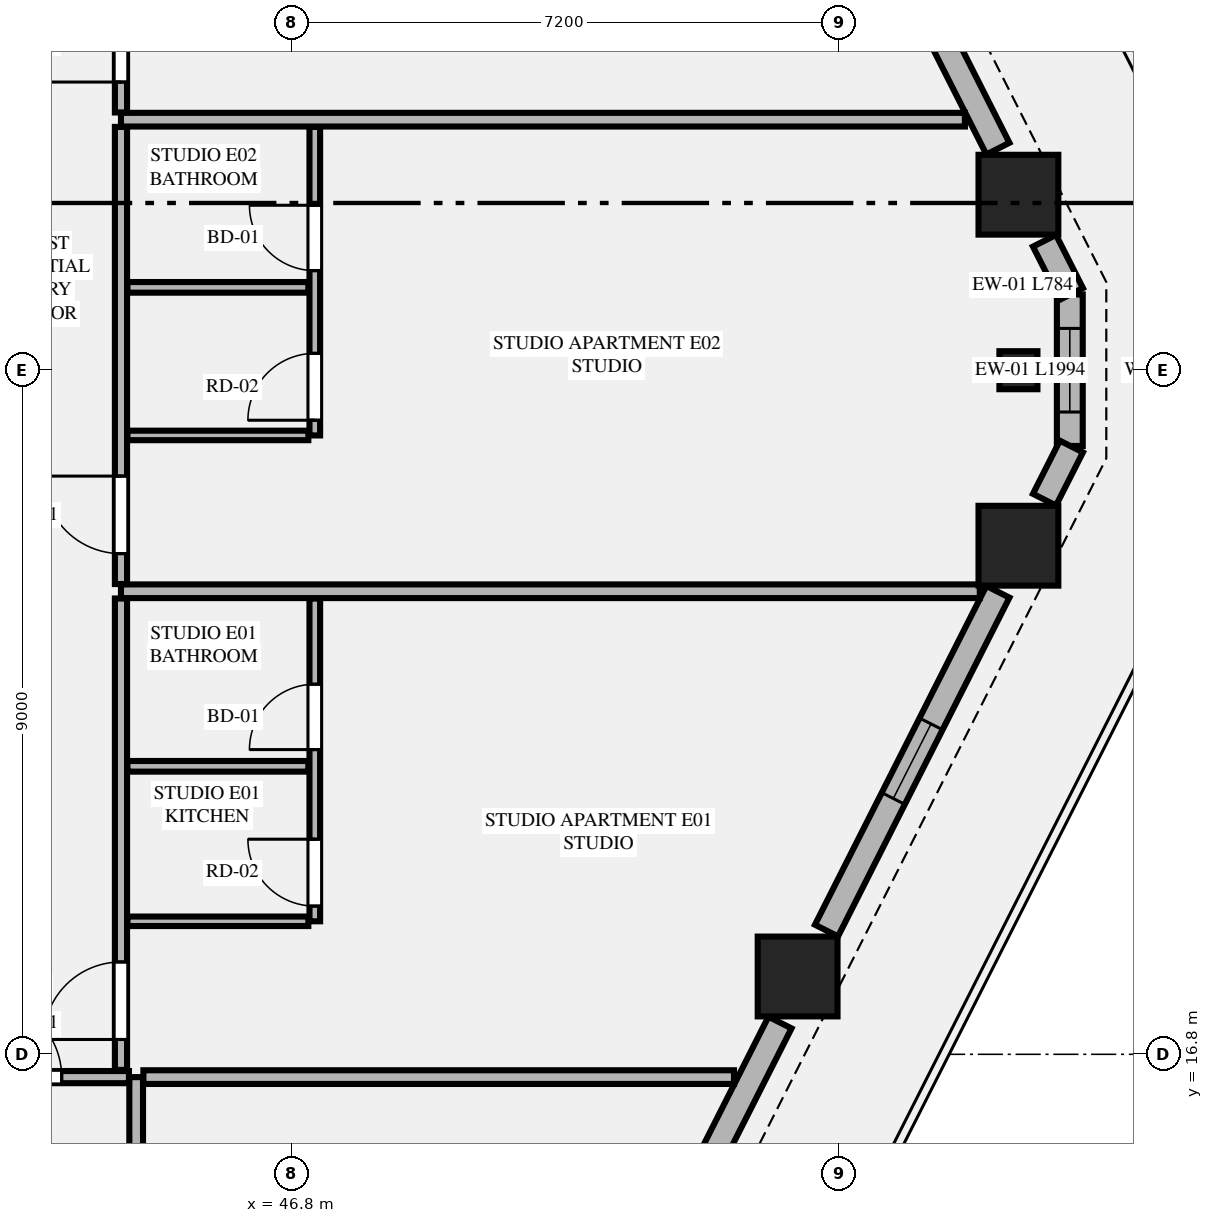
"""IFC4 building model, lengths in metres.
Left out: names, types, materials, properties, quantities, classifications, styles, units other than length and angle.
Written with IfcOpenShell. Run it as: python <this file> out.ifc"""

import sys

from ifc_helpers import new_model, si_unit, direction, frame, frame_2d, origin, origin_2d, place, context, subcontext, project, spatial, rectangle, extrude, element, fill, save


model = new_model("IFC4")
c1 = context("Model", 3, precision=1e-05, world=origin(), true_north=direction((0.0, 1.0)))
c2 = subcontext(c1, "Body", "Model", "MODEL_VIEW")
j1 = project(units=[si_unit("LENGTHUNIT", "METRE"), si_unit("PLANEANGLEUNIT", "RADIAN")], contexts=[c1])
p1 = place(None, origin())
s1 = spatial("IfcSite", under=j1, at=p1, CompositionType="ELEMENT")
p2 = place(p1, origin())
s2 = spatial("IfcBuilding", under=s1, at=p2, CompositionType="ELEMENT")
p3 = place(p2, frame((0.0, 0.0, 98.4)))
s3 = spatial("IfcBuildingStorey", under=s2, at=p3, CompositionType="ELEMENT", Elevation=98.4)
for number, where, z_axis, x_axis in (
    (1, (53.452, 17.824, 0.0), (0.0, 0.0, 1.0), (1.0, 0.0, 0.0)),
    (2, (56.357, 23.491, 0.0), (0.0, 0.0, 1.0), (1.0, 0.0, 0.0)),
    (3, (56.357, 28.109, 0.0), (0.0, 0.0, 1.0), (1.0, 0.0, 0.0)),
):
    element("IfcColumn", number, at=place(p3, frame(where, z_axis=z_axis, x_axis=x_axis)), inside=s3, PredefinedType="COLUMN", context=c2, shape_type="SweptSolid", body=[
        extrude(rectangle(XDim=1.05, YDim=1.05, at=origin_2d()), origin(), (0.0, 0.0, 1.0), 3.55),
    ])
p4 = place(p3, frame((56.357, 25.8, 0.0), z_axis=(0.0, 0.0, 1.0), x_axis=(0.0, 1.0, 0.0)))
e4 = element("IfcColumn", 4, at=p4, inside=s3, PredefinedType="PILASTER", context=c2, shape_type="SweptSolid", body=[
    extrude(rectangle(XDim=0.5, YDim=0.35, at=origin_2d()), origin(), (0.0, 0.0, 1.0), 3.55),
])
p5 = place(p3, frame((57.033, 24.803, 0.0), z_axis=(0.0, 0.0, 1.0), x_axis=(0.0, 1.0, 0.0)))
e5 = element("IfcWall", 5, at=p5, inside=s3, PredefinedType="STANDARD", context=c2, shape_type="SweptSolid", body=[
    extrude(rectangle(XDim=1.994, YDim=0.34, at=frame_2d((0.997, 0.0))), origin(), (0.0, 0.0, 1.0), 3.34),
])
p6 = place(p5, frame((0.447, 0.0, 0.75)))
e6 = element("IfcOpeningElement", 6, at=p6, cuts=e5, PredefinedType="OPENING", context=c2, shape_type="SweptSolid", body=[
    extrude(rectangle(XDim=1.1, YDim=2.0, at=frame_2d((0.55, 1.0))), frame((0.0, 0.18, 0.0), z_axis=(0.0, -1.0, 0.0), x_axis=(1.0, 0.0, 0.0)), (0.0, 0.0, 1.0), 0.36),
])
p7 = place(p3, frame((50.863, 12.561, 0.0), z_axis=(0.0, 0.0, 1.0), x_axis=(0.451567731634, 0.892236842855, 0.0)))
e7 = element("IfcWall", 7, at=p7, inside=s3, PredefinedType="STANDARD", context=c2, shape_type="SweptSolid", body=[
    extrude(rectangle(XDim=5.219, YDim=0.34, at=frame_2d((2.61, 0.0))), origin(), (0.0, 0.0, 1.0), 2.797),
])
p8 = place(p7, frame((2.06, 0.0, 0.75)))
e8 = element("IfcOpeningElement", 8, at=p8, cuts=e7, PredefinedType="OPENING", context=c2, shape_type="SweptSolid", body=[
    extrude(rectangle(XDim=1.1, YDim=1.897, at=frame_2d((0.55, 0.948))), frame((0.0, 0.18, 0.0), z_axis=(0.0, -1.0, 0.0), x_axis=(1.0, 0.0, 0.0)), (0.0, 0.0, 1.0), 0.36),
])
p9 = place(p3, frame((53.832, 18.428, 0.0), z_axis=(0.0, 0.0, 1.0), x_axis=(0.451431617681, 0.892305718102, 0.0)))
e9 = element("IfcWall", 9, at=p9, inside=s3, PredefinedType="STANDARD", context=c2, shape_type="SweptSolid", body=[
    extrude(rectangle(XDim=4.995, YDim=0.34, at=frame_2d((2.498, 0.0))), origin(), (0.0, 0.0, 1.0), 2.797),
])
p10 = place(p9, frame((1.947, 0.0, 0.75)))
e10 = element("IfcOpeningElement", 10, at=p10, cuts=e9, PredefinedType="OPENING", context=c2, shape_type="SweptSolid", body=[
    extrude(rectangle(XDim=1.1, YDim=1.897, at=frame_2d((0.55, 0.948))), frame((0.0, 0.18, 0.0), z_axis=(0.0, -1.0, 0.0), x_axis=(1.0, 0.0, 0.0)), (0.0, 0.0, 1.0), 0.36),
])
for number, where, z_axis, x_axis in (
    (11, (56.7, 24.097, 0.0), (0.0, 0.0, 1.0), (0.452, 0.892, 0.0)),
    (12, (57.054, 26.804, 0.0), (0.0, 0.0, 1.0), (-0.452, 0.892, 0.0)),
):
    element("IfcWall", number, at=place(p3, frame(where, z_axis=z_axis, x_axis=x_axis)), inside=s3, PredefinedType="STANDARD", context=c2, shape_type="SweptSolid", body=[
        extrude(rectangle(XDim=0.783, YDim=0.34, at=frame_2d((0.392, 0.0))), origin(), (0.0, 0.0, 1.0), 3.34),
    ])
p11 = place(p3, frame((56.087, 28.715, 0.0), z_axis=(0.0, 0.0, 1.0), x_axis=(-0.451431617681, 0.892305718102, 0.0)))
e13 = element("IfcWall", 13, at=p11, inside=s3, PredefinedType="STANDARD", context=c2, shape_type="SweptSolid", body=[
    extrude(rectangle(XDim=4.995, YDim=0.34, at=frame_2d((2.498, 0.0))), origin(), (0.0, 0.0, 1.0), 2.797),
])
p12 = place(p11, frame((1.947, 0.0, 0.75)))
e14 = element("IfcOpeningElement", 14, at=p12, cuts=e13, PredefinedType="OPENING", context=c2, shape_type="SweptSolid", body=[
    extrude(rectangle(XDim=1.1, YDim=1.897, at=frame_2d((0.55, 0.948))), frame((0.0, 0.18, 0.0), z_axis=(0.0, -1.0, 0.0), x_axis=(1.0, 0.0, 0.0)), (0.0, 0.0, 1.0), 0.36),
])
p13 = place(p3, frame((44.75, 4.105, 0.0), z_axis=(0.0, 0.0, 1.0), x_axis=(0.0, 1.0, 0.0)))
e15 = element("IfcWall", 15, at=p13, inside=s3, PredefinedType="PARTITIONING", context=c2, shape_type="SweptSolid", body=[
    extrude(rectangle(XDim=12.395, YDim=0.18, at=frame_2d((6.198, 0.0))), origin(), (0.0, 0.0, 1.0), 3.34),
])
p14 = place(p3, frame((28.663, 16.5, 0.0), z_axis=(0.0, 0.0, 1.0), x_axis=(1.0, 0.0, 0.0)))
e16 = element("IfcWall", 16, at=p14, inside=s3, PredefinedType="PARTITIONING", context=c2, shape_type="SweptSolid", body=[
    extrude(rectangle(XDim=15.992, YDim=0.16, at=frame_2d((7.996, 0.0))), origin(), (0.0, 0.0, 1.0), 3.34),
])
p15 = place(p14, frame((14.087, 0.0, 0.0)))
e17 = element("IfcOpeningElement", 17, at=p15, cuts=e16, PredefinedType="OPENING", context=c2, shape_type="SweptSolid", body=[
    extrude(rectangle(XDim=1.02, YDim=2.25, at=frame_2d((0.51, 1.125))), frame((0.0, 0.09, 0.0), z_axis=(0.0, -1.0, 0.0), x_axis=(1.0, 0.0, 0.0)), (0.0, 0.0, 1.0), 0.18),
])
p16 = place(p3, frame((44.845, 16.5, 0.0), z_axis=(0.0, 0.0, 1.0), x_axis=(1.0, 0.0, 0.0)))
e18 = element("IfcWall", 18, at=p16, inside=s3, PredefinedType="PARTITIONING", context=c2, shape_type="SweptSolid", body=[
    extrude(rectangle(XDim=7.77, YDim=0.18, at=frame_2d((3.885, 0.0))), origin(), (0.0, 0.0, 1.0), 3.34),
])
p17 = place(p3, frame((44.55, 16.595, 0.0), z_axis=(0.0, 0.0, 1.0), x_axis=(0.0, 1.0, 0.0)))
e19 = element("IfcWall", 19, at=p17, inside=s3, PredefinedType="PARTITIONING", context=c2, shape_type="SweptSolid", body=[
    extrude(rectangle(XDim=6.202, YDim=0.16, at=frame_2d((3.101, 0.0))), origin(), (0.0, 0.0, 1.0), 3.34),
])
p18 = place(p17, frame((0.4, 0.0, 0.0)))
e20 = element("IfcOpeningElement", 20, at=p18, cuts=e19, PredefinedType="OPENING", context=c2, shape_type="SweptSolid", body=[
    extrude(rectangle(XDim=1.02, YDim=2.25, at=frame_2d((0.51, 1.125))), frame((0.0, 0.09, 0.0), z_axis=(0.0, -1.0, 0.0), x_axis=(1.0, 0.0, 0.0)), (0.0, 0.0, 1.0), 0.18),
])
p19 = place(p3, frame((44.635, 18.55, 0.0), z_axis=(0.0, 0.0, 1.0), x_axis=(1.0, 0.0, 0.0)))
e21 = element("IfcWall", 21, at=p19, inside=s3, PredefinedType="PARTITIONING", context=c2, shape_type="SweptSolid", body=[
    extrude(rectangle(XDim=2.38, YDim=0.125, at=frame_2d((1.19, 0.0))), origin(), (0.0, 0.0, 1.0), 2.722),
])
p20 = place(p3, frame((47.1, 18.55, 0.0), z_axis=(0.0, 0.0, 1.0), x_axis=(0.0, 1.0, 0.0)))
e22 = element("IfcWall", 22, at=p20, inside=s3, PredefinedType="PLUMBINGWALL", context=c2, shape_type="SweptSolid", body=[
    extrude(rectangle(XDim=4.247, YDim=0.14, at=frame_2d((2.124, 0.0))), origin(), (0.0, 0.0, 1.0), 3.34),
])
p21 = place(p20, frame((2.259, 0.0, 0.0)))
e23 = element("IfcOpeningElement", 23, at=p21, cuts=e22, PredefinedType="OPENING", context=c2, shape_type="SweptSolid", body=[
    extrude(rectangle(XDim=0.86, YDim=2.1, at=frame_2d((0.43, 1.05))), frame((0.0, 0.08, 0.0), z_axis=(0.0, -1.0, 0.0), x_axis=(1.0, 0.0, 0.0)), (0.0, 0.0, 1.0), 0.16),
])
p22 = place(p20, frame((0.2, 0.0, 0.0)))
e24 = element("IfcOpeningElement", 24, at=p22, cuts=e22, PredefinedType="OPENING", context=c2, shape_type="SweptSolid", body=[
    extrude(rectangle(XDim=0.88, YDim=2.15, at=frame_2d((0.44, 1.075))), frame((0.0, 0.08, 0.0), z_axis=(0.0, -1.0, 0.0), x_axis=(1.0, 0.0, 0.0)), (0.0, 0.0, 1.0), 0.16),
])
p23 = place(p3, frame((44.635, 20.589, 0.0), z_axis=(0.0, 0.0, 1.0), x_axis=(1.0, 0.0, 0.0)))
e25 = element("IfcWall", 25, at=p23, inside=s3, PredefinedType="PLUMBINGWALL", context=c2, shape_type="SweptSolid", body=[
    extrude(rectangle(XDim=2.38, YDim=0.14, at=frame_2d((1.19, 0.0))), origin(), (0.0, 0.0, 1.0), 3.34),
])
p24 = place(p3, frame((44.55, 22.892, 0.0), z_axis=(0.0, 0.0, 1.0), x_axis=(1.0, 0.0, 0.0)))
e26 = element("IfcWall", 26, at=p24, inside=s3, PredefinedType="PARTITIONING", context=c2, shape_type="SweptSolid", body=[
    extrude(rectangle(XDim=11.299, YDim=0.18, at=frame_2d((5.649, 0.0))), origin(), (0.0, 0.0, 1.0), 3.34),
])
p25 = place(p3, frame((44.55, 22.987, 0.0), z_axis=(0.0, 0.0, 1.0), x_axis=(0.0, 1.0, 0.0)))
e27 = element("IfcWall", 27, at=p25, inside=s3, PredefinedType="PARTITIONING", context=c2, shape_type="SweptSolid", body=[
    extrude(rectangle(XDim=6.014, YDim=0.16, at=frame_2d((3.007, 0.0))), origin(), (0.0, 0.0, 1.0), 3.34),
])
p26 = place(p25, frame((0.4, 0.0, 0.0)))
e28 = element("IfcOpeningElement", 28, at=p26, cuts=e27, PredefinedType="OPENING", context=c2, shape_type="SweptSolid", body=[
    extrude(rectangle(XDim=1.02, YDim=2.25, at=frame_2d((0.51, 1.125))), frame((0.0, 0.09, 0.0), z_axis=(0.0, -1.0, 0.0), x_axis=(1.0, 0.0, 0.0)), (0.0, 0.0, 1.0), 0.18),
])
p27 = place(p3, frame((44.635, 24.942, 0.0), z_axis=(0.0, 0.0, 1.0), x_axis=(1.0, 0.0, 0.0)))
e29 = element("IfcWall", 29, at=p27, inside=s3, PredefinedType="PARTITIONING", context=c2, shape_type="SweptSolid", body=[
    extrude(rectangle(XDim=2.38, YDim=0.125, at=frame_2d((1.19, 0.0))), origin(), (0.0, 0.0, 1.0), 3.34),
])
p28 = place(p3, frame((47.1, 24.942, 0.0), z_axis=(0.0, 0.0, 1.0), x_axis=(0.0, 1.0, 0.0)))
e30 = element("IfcWall", 30, at=p28, inside=s3, PredefinedType="PLUMBINGWALL", context=c2, shape_type="SweptSolid", body=[
    extrude(rectangle(XDim=4.059, YDim=0.14, at=frame_2d((2.03, 0.0))), origin(), (0.0, 0.0, 1.0), 3.34),
])
p29 = place(p28, frame((2.168, 0.0, 0.0)))
e31 = element("IfcOpeningElement", 31, at=p29, cuts=e30, PredefinedType="OPENING", context=c2, shape_type="SweptSolid", body=[
    extrude(rectangle(XDim=0.86, YDim=2.1, at=frame_2d((0.43, 1.05))), frame((0.0, 0.08, 0.0), z_axis=(0.0, -1.0, 0.0), x_axis=(1.0, 0.0, 0.0)), (0.0, 0.0, 1.0), 0.16),
])
p30 = place(p28, frame((0.2, 0.0, 0.0)))
e32 = element("IfcOpeningElement", 32, at=p30, cuts=e30, PredefinedType="OPENING", context=c2, shape_type="SweptSolid", body=[
    extrude(rectangle(XDim=0.88, YDim=2.15, at=frame_2d((0.44, 1.075))), frame((0.0, 0.08, 0.0), z_axis=(0.0, -1.0, 0.0), x_axis=(1.0, 0.0, 0.0)), (0.0, 0.0, 1.0), 0.16),
])
p31 = place(p3, frame((44.635, 26.89, 0.0), z_axis=(0.0, 0.0, 1.0), x_axis=(1.0, 0.0, 0.0)))
e33 = element("IfcWall", 33, at=p31, inside=s3, PredefinedType="PLUMBINGWALL", context=c2, shape_type="SweptSolid", body=[
    extrude(rectangle(XDim=2.38, YDim=0.14, at=frame_2d((1.19, 0.0))), origin(), (0.0, 0.0, 1.0), 3.34),
])
p32 = place(p3, frame((44.55, 29.096, 0.0), z_axis=(0.0, 0.0, 1.0), x_axis=(1.0, 0.0, 0.0)))
e34 = element("IfcWall", 34, at=p32, inside=s3, PredefinedType="PARTITIONING", context=c2, shape_type="SweptSolid", body=[
    extrude(rectangle(XDim=11.103, YDim=0.18, at=frame_2d((5.552, 0.0))), origin(), (0.0, 0.0, 1.0), 3.34),
])
p33 = place(p3, frame((44.55, 29.191, 0.0), z_axis=(0.0, 0.0, 1.0), x_axis=(0.0, 1.0, 0.0)))
e35 = element("IfcWall", 35, at=p33, inside=s3, PredefinedType="PARTITIONING", context=c2, shape_type="SweptSolid", body=[
    extrude(rectangle(XDim=6.014, YDim=0.16, at=frame_2d((3.007, 0.0))), origin(), (0.0, 0.0, 1.0), 3.34),
])
p34 = place(p33, frame((0.4, 0.0, 0.0)))
e36 = element("IfcOpeningElement", 36, at=p34, cuts=e35, PredefinedType="OPENING", context=c2, shape_type="SweptSolid", body=[
    extrude(rectangle(XDim=1.02, YDim=2.25, at=frame_2d((0.51, 1.125))), frame((0.0, 0.09, 0.0), z_axis=(0.0, -1.0, 0.0), x_axis=(1.0, 0.0, 0.0)), (0.0, 0.0, 1.0), 0.18),
])
p35 = place(p10, origin())
e37 = element("IfcWindow", 37, at=p35, inside=s3, PartitioningType="SINGLE_PANEL", PredefinedType="WINDOW", context=c2, shape_type="SweptSolid", body=[
    extrude(rectangle(XDim=1.1, YDim=1.897, at=frame_2d((0.55, 0.948))), frame((0.0, 0.03, 0.0), z_axis=(0.0, -1.0, 0.0), x_axis=(1.0, 0.0, 0.0)), (0.0, 0.0, 1.0), 0.06),
])
fill(e10, e37)
p36 = place(p15, origin())
e38 = element("IfcDoor", 38, at=p36, inside=s3, OperationType="SINGLE_SWING_LEFT", PredefinedType="DOOR", context=c2, shape_type="SweptSolid", body=[
    extrude(rectangle(XDim=1.02, YDim=2.25, at=frame_2d((0.51, 1.125))), frame((0.0, 0.025, 0.0), z_axis=(0.0, -1.0, 0.0), x_axis=(1.0, 0.0, 0.0)), (0.0, 0.0, 1.0), 0.05),
])
fill(e17, e38)
p37 = place(p21, origin())
e39 = element("IfcDoor", 39, at=p37, inside=s3, OperationType="SINGLE_SWING_LEFT", PredefinedType="DOOR", context=c2, shape_type="SweptSolid", body=[
    extrude(rectangle(XDim=0.86, YDim=2.1, at=frame_2d((0.43, 1.05))), frame((0.0, 0.025, 0.0), z_axis=(0.0, -1.0, 0.0), x_axis=(1.0, 0.0, 0.0)), (0.0, 0.0, 1.0), 0.05),
])
fill(e23, e39)
p38 = place(p18, origin())
e40 = element("IfcDoor", 40, at=p38, inside=s3, OperationType="SINGLE_SWING_LEFT", PredefinedType="DOOR", context=c2, shape_type="SweptSolid", body=[
    extrude(rectangle(XDim=1.02, YDim=2.25, at=frame_2d((0.51, 1.125))), frame((0.0, 0.025, 0.0), z_axis=(0.0, -1.0, 0.0), x_axis=(1.0, 0.0, 0.0)), (0.0, 0.0, 1.0), 0.05),
])
fill(e20, e40)
p39 = place(p22, origin())
e41 = element("IfcDoor", 41, at=p39, inside=s3, OperationType="SINGLE_SWING_RIGHT", PredefinedType="DOOR", context=c2, shape_type="SweptSolid", body=[
    extrude(rectangle(XDim=0.88, YDim=2.15, at=frame_2d((0.44, 1.075))), frame((0.0, 0.025, 0.0), z_axis=(0.0, -1.0, 0.0), x_axis=(1.0, 0.0, 0.0)), (0.0, 0.0, 1.0), 0.05),
])
fill(e24, e41)
p40 = place(p29, origin())
e42 = element("IfcDoor", 42, at=p40, inside=s3, OperationType="SINGLE_SWING_RIGHT", PredefinedType="DOOR", context=c2, shape_type="SweptSolid", body=[
    extrude(rectangle(XDim=0.86, YDim=2.1, at=frame_2d((0.43, 1.05))), frame((0.0, 0.025, 0.0), z_axis=(0.0, -1.0, 0.0), x_axis=(1.0, 0.0, 0.0)), (0.0, 0.0, 1.0), 0.05),
])
fill(e31, e42)
p41 = place(p26, origin())
e43 = element("IfcDoor", 43, at=p41, inside=s3, OperationType="SINGLE_SWING_RIGHT", PredefinedType="DOOR", context=c2, shape_type="SweptSolid", body=[
    extrude(rectangle(XDim=1.02, YDim=2.25, at=frame_2d((0.51, 1.125))), frame((0.0, 0.025, 0.0), z_axis=(0.0, -1.0, 0.0), x_axis=(1.0, 0.0, 0.0)), (0.0, 0.0, 1.0), 0.05),
])
fill(e28, e43)
p42 = place(p30, origin())
e44 = element("IfcDoor", 44, at=p42, inside=s3, OperationType="SINGLE_SWING_LEFT", PredefinedType="DOOR", context=c2, shape_type="SweptSolid", body=[
    extrude(rectangle(XDim=0.88, YDim=2.15, at=frame_2d((0.44, 1.075))), frame((0.0, 0.025, 0.0), z_axis=(0.0, -1.0, 0.0), x_axis=(1.0, 0.0, 0.0)), (0.0, 0.0, 1.0), 0.05),
])
fill(e32, e44)
p43 = place(p34, origin())
e45 = element("IfcDoor", 45, at=p43, inside=s3, OperationType="SINGLE_SWING_LEFT", PredefinedType="DOOR", context=c2, shape_type="SweptSolid", body=[
    extrude(rectangle(XDim=1.02, YDim=2.25, at=frame_2d((0.51, 1.125))), frame((0.0, 0.025, 0.0), z_axis=(0.0, -1.0, 0.0), x_axis=(1.0, 0.0, 0.0)), (0.0, 0.0, 1.0), 0.05),
])
fill(e36, e45)
p44 = place(p6, origin())
e46 = element("IfcWindow", 46, at=p44, inside=s3, PartitioningType="SINGLE_PANEL", PredefinedType="WINDOW", context=c2, shape_type="SweptSolid", body=[
    extrude(rectangle(XDim=1.1, YDim=2.0, at=frame_2d((0.55, 1.0))), frame((0.0, 0.03, 0.0), z_axis=(0.0, -1.0, 0.0), x_axis=(1.0, 0.0, 0.0)), (0.0, 0.0, 1.0), 0.06),
])
fill(e6, e46)
save(model, sys.argv[1])
